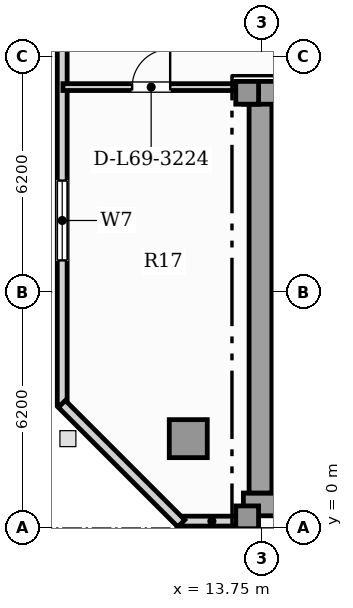
"""IFC4 building model, lengths in metres.
Left out: names, types, materials, properties, quantities, classifications, styles, units other than length and angle.
Written with IfcOpenShell. Run it as: python <this file> out.ifc"""

import sys

from ifc_helpers import new_model, si_unit, direction, frame, frame_2d, origin, origin_2d, place, context, subcontext, project, spatial, rectangle, hollow_rectangle, extrude, element, fill, save


model = new_model("IFC4")
c1 = context("Model", 3, precision=1e-05, world=origin(), true_north=direction((0.0, 1.0)))
c2 = subcontext(c1, "Body", "Model", "MODEL_VIEW")
j1 = project(units=[si_unit("LENGTHUNIT", "METRE"), si_unit("PLANEANGLEUNIT", "RADIAN")], contexts=[c1])
p1 = place(None, origin())
s1 = spatial("IfcSite", under=j1, at=p1, CompositionType="ELEMENT")
p2 = place(p1, origin())
s2 = spatial("IfcBuilding", under=s1, at=p2, CompositionType="ELEMENT")
p3 = place(p2, frame((0.0, 0.0, 281.05)))
s3 = spatial("IfcBuildingStorey", under=s2, at=p3, CompositionType="ELEMENT", Elevation=281.05)
p4 = place(p3, frame((13.25, 0.62, 0.0), z_axis=(0.0, 0.0, 1.0), x_axis=(1.0, 0.0, 0.0)))
e1 = element("IfcWall", 1, at=p4, inside=s3, PredefinedType="SHEAR", context=c2, shape_type="SweptSolid", body=[
    extrude(rectangle(XDim=31.0, YDim=0.6, at=frame_2d((15.5, 0.0))), origin(), (0.0, 0.0, 1.0), 3.65),
])
p5 = place(p3, frame((13.7, 0.92, 0.0), z_axis=(0.0, 0.0, 1.0), x_axis=(0.0, 1.0, 0.0)))
e2 = element("IfcWall", 2, at=p5, inside=s3, PredefinedType="SHEAR", context=c2, shape_type="SweptSolid", body=[
    extrude(rectangle(XDim=10.53, YDim=0.6, at=frame_2d((5.265, 0.0))), origin(), (0.0, 0.0, 1.0), 3.65),
])
p6 = place(p3, frame((13.25, 11.45, 0.0), z_axis=(0.0, 0.0, 1.0), x_axis=(1.0, 0.0, 0.0)))
e3 = element("IfcWall", 3, at=p6, inside=s3, PredefinedType="SHEAR", context=c2, shape_type="SweptSolid", body=[
    extrude(rectangle(XDim=2.95, YDim=0.6, at=frame_2d((1.475, 0.0))), origin(), (0.0, 0.0, 1.0), 3.65),
])
for number, where, z_axis, x_axis in (
    (4, (13.35, 0.28, 0.0), (0.0, 0.0, 1.0), (1.0, 0.0, 0.0)),
    (5, (13.35, 11.45, 0.0), (0.0, 0.0, 1.0), (1.0, 0.0, 0.0)),
):
    element("IfcColumn", number, at=place(p3, frame(where, z_axis=z_axis, x_axis=x_axis)), inside=s3, PredefinedType="COLUMN", context=c2, shape_type="SweptSolid", body=[
        extrude(rectangle(XDim=0.6, YDim=0.6, at=origin_2d()), origin(), (0.0, 0.0, 1.0), 3.85),
    ])
p7 = place(p3, frame((11.8, 2.35, 0.0), z_axis=(0.0, 0.0, 1.0), x_axis=(1.0, 0.0, 0.0)))
e6 = element("IfcColumn", 6, at=p7, inside=s3, PredefinedType="USERDEFINED", context=c2, shape_type="SweptSolid", body=[
    extrude(hollow_rectangle(XDim=1.0, YDim=1.0, WallThickness=0.06, at=origin_2d()), origin(), (0.0, 0.0, 1.0), 3.85),
])
p8 = place(p3, frame((11.593, 0.18, 0.0), z_axis=(0.0, 0.0, 1.0), x_axis=(1.0, 0.0, 0.0)))
e7 = element("IfcWall", 7, at=p8, inside=s3, PredefinedType="SOLIDWALL", context=c2, shape_type="SweptSolid", body=[
    extrude(rectangle(XDim=1.657, YDim=0.26, at=frame_2d((0.829, 0.0))), origin(), (0.0, 0.0, 1.0), 3.65),
])
p9 = place(p3, frame((8.483, 18.076, 0.0), z_axis=(0.0, 0.0, 1.0), x_axis=(0.0, -1.0, 0.0)))
e8 = element("IfcWall", 8, at=p9, inside=s3, PredefinedType="SOLIDWALL", context=c2, shape_type="SweptSolid", body=[
    extrude(rectangle(XDim=14.836, YDim=0.26, at=frame_2d((7.418, 0.0))), origin(), (0.0, 0.0, 1.0), 3.65),
])
p10 = place(p9, frame((8.936, 0.0, 0.85)))
e9 = element("IfcOpeningElement", 9, at=p10, cuts=e8, PredefinedType="OPENING", context=c2, shape_type="SweptSolid", body=[
    extrude(rectangle(XDim=2.1, YDim=2.05, at=frame_2d((1.05, 1.025))), frame((0.0, 0.14, 0.0), z_axis=(0.0, -1.0, 0.0), x_axis=(1.0, 0.0, 0.0)), (0.0, 0.0, 1.0), 0.28),
])
p11 = place(p3, frame((8.473, 3.264, 0.0), z_axis=(0.0, 0.0, 1.0), x_axis=(0.707079321262, -0.707134240044, 0.0)))
e10 = element("IfcWall", 10, at=p11, inside=s3, PredefinedType="SOLIDWALL", context=c2, shape_type="SweptSolid", body=[
    extrude(rectangle(XDim=4.446, YDim=0.26, at=frame_2d((2.223, 0.0))), origin(), (0.0, 0.0, 1.0), 3.65),
])
p12 = place(p3, frame((14.04, 8.52, 0.0), z_axis=(0.0, 0.0, 1.0), x_axis=(1.0, 0.0, 0.0)))
e11 = element("IfcWall", 11, at=p12, inside=s3, PredefinedType="SOLIDWALL", context=c2, shape_type="SweptSolid", body=[
    extrude(rectangle(XDim=3.4, YDim=0.22, at=frame_2d((1.7, 0.0))), origin(), (0.0, 0.0, 1.0), 3.65),
])
p13 = place(p12, frame((1.125, 0.0, 0.0)))
e12 = element("IfcOpeningElement", 12, at=p13, cuts=e11, PredefinedType="OPENING", context=c2, shape_type="SweptSolid", body=[
    extrude(rectangle(XDim=1.15, YDim=2.2, at=frame_2d((0.575, 1.1))), frame((0.0, 0.12, 0.0), z_axis=(0.0, -1.0, 0.0), x_axis=(1.0, 0.0, 0.0)), (0.0, 0.0, 1.0), 0.24),
])
p14 = place(p3, frame((8.503, 11.6, 0.0), z_axis=(0.0, 0.0, 1.0), x_axis=(1.0, 0.0, 0.0)))
e13 = element("IfcWall", 13, at=p14, inside=s3, PredefinedType="PARTITIONING", context=c2, shape_type="SweptSolid", body=[
    extrude(rectangle(XDim=4.642, YDim=0.18, at=frame_2d((2.321, 0.0))), origin(), (0.0, 0.0, 1.0), 3.65),
])
p15 = place(p14, frame((1.821, 0.0, 0.0)))
e14 = element("IfcOpeningElement", 14, at=p15, cuts=e13, PredefinedType="OPENING", context=c2, shape_type="SweptSolid", body=[
    extrude(rectangle(XDim=1.0, YDim=2.15, at=frame_2d((0.5, 1.075))), frame((0.0, 0.1, 0.0), z_axis=(0.0, -1.0, 0.0), x_axis=(1.0, 0.0, 0.0)), (0.0, 0.0, 1.0), 0.2),
])
p16 = place(p10, origin())
e15 = element("IfcWindow", 15, at=p16, inside=s3, PartitioningType="SINGLE_PANEL", PredefinedType="WINDOW", context=c2, shape_type="SweptSolid", body=[
    extrude(rectangle(XDim=2.1, YDim=2.05, at=frame_2d((1.05, 1.025))), frame((0.0, 0.03, 0.0), z_axis=(0.0, -1.0, 0.0), x_axis=(1.0, 0.0, 0.0)), (0.0, 0.0, 1.0), 0.06),
])
fill(e9, e15)
p17 = place(p15, origin())
e16 = element("IfcDoor", 16, at=p17, inside=s3, OperationType="SINGLE_SWING_RIGHT", PredefinedType="DOOR", context=c2, shape_type="SweptSolid", body=[
    extrude(rectangle(XDim=1.0, YDim=2.15, at=frame_2d((0.5, 1.075))), frame((0.0, 0.025, 0.0), z_axis=(0.0, -1.0, 0.0), x_axis=(1.0, 0.0, 0.0)), (0.0, 0.0, 1.0), 0.05),
])
fill(e14, e16)
save(model, sys.argv[1])
